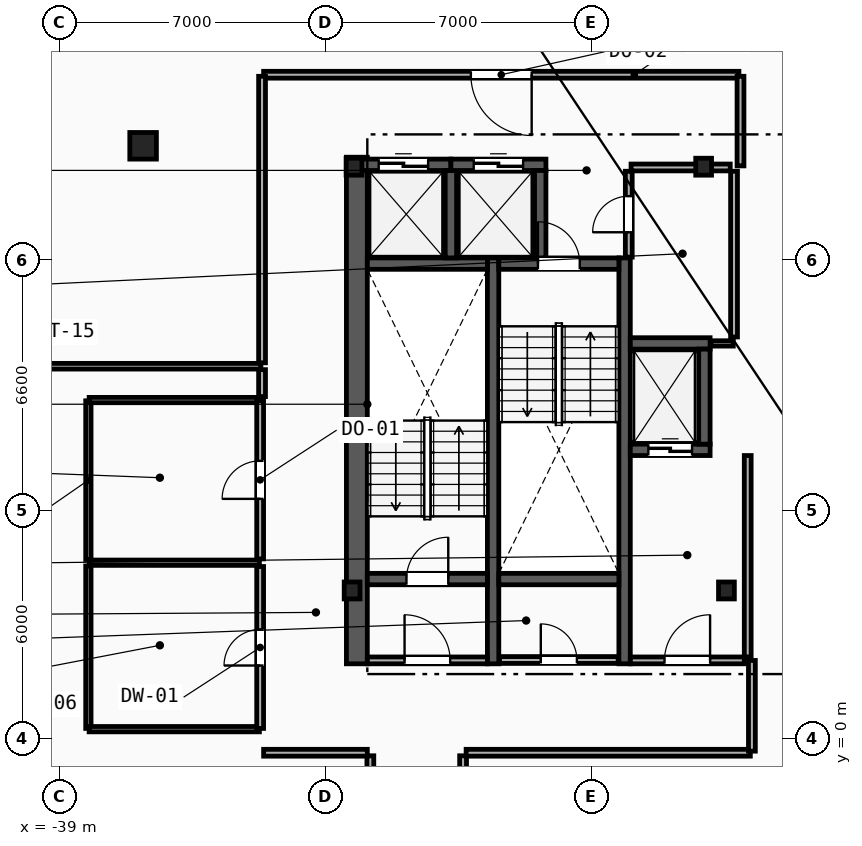
"""IFC4 building model, lengths in metres.
Left out: names, types, materials, properties, quantities, classifications, styles, units other than length and angle.
Written with IfcOpenShell. Run it as: python <this file> out.ifc"""

import sys

from ifc_helpers import new_model, si_unit, direction, frame, frame_2d, origin, origin_2d, place, context, subcontext, project, spatial, rectangle, i_section, extrude, element, fill, save


model = new_model("IFC4")
c1 = context("Model", 3, precision=1e-05, world=origin(), true_north=direction((0.0, 1.0)))
c2 = subcontext(c1, "Body", "Model", "MODEL_VIEW")
j1 = project(units=[si_unit("LENGTHUNIT", "METRE"), si_unit("PLANEANGLEUNIT", "RADIAN")], contexts=[c1])
p1 = place(None, origin())
s1 = spatial("IfcSite", under=j1, at=p1, CompositionType="ELEMENT")
p2 = place(p1, origin())
s2 = spatial("IfcBuilding", under=s1, at=p2, CompositionType="ELEMENT")
p3 = place(p2, frame((0.0, 0.0, 275.6)))
s3 = spatial("IfcBuildingStorey", under=s2, at=p3, CompositionType="ELEMENT", Elevation=275.6)
for number, where, z_axis, x_axis in (
    (1, (-31.3, 3.9, 0.0), (0.0, 0.0, 1.0), (1.0, 0.0, 0.0)),
    (2, (-21.45, 3.9, 0.0), (0.0, 0.0, 1.0), (1.0, 0.0, 0.0)),
    (3, (-22.05, 15.05, 0.0), (0.0, 0.0, 1.0), (1.0, 0.0, 0.0)),
    (4, (-31.25, 15.05, 0.0), (0.0, 0.0, 1.0), (1.0, 0.0, 0.0)),
):
    element("IfcColumn", number, at=place(p3, frame(where, z_axis=z_axis, x_axis=x_axis)), inside=s3, PredefinedType="COLUMN", context=c2, shape_type="SweptSolid", body=[
        extrude(i_section(OverallWidth=0.416, OverallDepth=0.446, WebThickness=0.039, FlangeThickness=0.063, FilletRadius=0.018, at=origin_2d()), origin(), (0.0, 0.0, 1.0), 3.6),
    ])
p4 = place(p3, frame((-36.8, 15.6, 0.0), z_axis=(0.0, 0.0, 1.0), x_axis=(1.0, 0.0, 0.0)))
e5 = element("IfcColumn", 5, at=p4, inside=s3, PredefinedType="COLUMN", context=c2, shape_type="SweptSolid", body=[
    extrude(rectangle(XDim=0.7, YDim=0.7, at=origin_2d()), origin(), (0.0, 0.0, 1.0), 3.6),
])
p5 = place(p3, frame((-31.175, 1.97, 0.0), z_axis=(0.0, 0.0, 1.0), x_axis=(0.0, 1.0, 0.0)))
e6 = element("IfcWall", 6, at=p5, inside=s3, PredefinedType="SHEAR", context=c2, shape_type="SweptSolid", body=[
    extrude(rectangle(XDim=13.33, YDim=0.55, at=frame_2d((6.665, 0.0))), origin(), (0.0, 0.0, 1.0), 3.34),
])
for number, where, z_axis, x_axis in (
    (7, (-27.59, 1.97, 0.0), (0.0, 0.0, 1.0), (0.0, 1.0, 0.0)),
    (8, (-24.13, 1.97, 0.0), (0.0, 0.0, 1.0), (0.0, 1.0, 0.0)),
):
    element("IfcWall", number, at=place(p3, frame(where, z_axis=z_axis, x_axis=x_axis)), inside=s3, PredefinedType="SHEAR", context=c2, shape_type="SweptSolid", body=[
        extrude(rectangle(XDim=10.68, YDim=0.3, at=frame_2d((5.34, 0.0))), origin(), (0.0, 0.0, 1.0), 3.34),
    ])
p6 = place(p3, frame((-30.9, 4.2, 0.0), z_axis=(0.0, 0.0, 1.0), x_axis=(1.0, 0.0, 0.0)))
e9 = element("IfcWall", 9, at=p6, inside=s3, PredefinedType="SHEAR", context=c2, shape_type="SweptSolid", body=[
    extrude(rectangle(XDim=3.16, YDim=0.3, at=frame_2d((1.58, 0.0))), origin(), (0.0, 0.0, 1.0), 3.34),
])
p7 = place(p6, frame((1.03, 0.0, 0.0)))
e10 = element("IfcOpeningElement", 10, at=p7, cuts=e9, PredefinedType="OPENING", context=c2, shape_type="SweptSolid", body=[
    extrude(rectangle(XDim=1.1, YDim=2.15, at=frame_2d((0.55, 1.075))), frame((0.0, 0.16, 0.0), z_axis=(0.0, -1.0, 0.0), x_axis=(1.0, 0.0, 0.0)), (0.0, 0.0, 1.0), 0.32),
])
p8 = place(p3, frame((-30.9, 12.5, 0.0), z_axis=(0.0, 0.0, 1.0), x_axis=(1.0, 0.0, 0.0)))
e11 = element("IfcWall", 11, at=p8, inside=s3, PredefinedType="SHEAR", context=c2, shape_type="SweptSolid", body=[
    extrude(rectangle(XDim=3.16, YDim=0.3, at=frame_2d((1.58, 0.0))), origin(), (0.0, 0.0, 1.0), 3.34),
])
p9 = place(p3, frame((-27.44, 12.5, 0.0), z_axis=(0.0, 0.0, 1.0), x_axis=(1.0, 0.0, 0.0)))
e12 = element("IfcWall", 12, at=p9, inside=s3, PredefinedType="SHEAR", context=c2, shape_type="SweptSolid", body=[
    extrude(rectangle(XDim=3.16, YDim=0.3, at=frame_2d((1.58, 0.0))), origin(), (0.0, 0.0, 1.0), 3.34),
])
p10 = place(p9, frame((1.03, 0.0, 0.0)))
e13 = element("IfcOpeningElement", 13, at=p10, cuts=e12, PredefinedType="OPENING", context=c2, shape_type="SweptSolid", body=[
    extrude(rectangle(XDim=1.1, YDim=2.15, at=frame_2d((0.55, 1.075))), frame((0.0, 0.16, 0.0), z_axis=(0.0, -1.0, 0.0), x_axis=(1.0, 0.0, 0.0)), (0.0, 0.0, 1.0), 0.32),
])
p11 = place(p3, frame((-27.44, 4.2, 0.0), z_axis=(0.0, 0.0, 1.0), x_axis=(1.0, 0.0, 0.0)))
e14 = element("IfcWall", 14, at=p11, inside=s3, PredefinedType="SHEAR", context=c2, shape_type="SweptSolid", body=[
    extrude(rectangle(XDim=3.16, YDim=0.3, at=frame_2d((1.58, 0.0))), origin(), (0.0, 0.0, 1.0), 3.34),
])
p12 = place(p3, frame((-20.89, 2.15, 0.0), z_axis=(0.0, 0.0, 1.0), x_axis=(0.0, 1.0, 0.0)))
e15 = element("IfcWall", 15, at=p12, inside=s3, PredefinedType="PARTITIONING", context=c2, shape_type="SweptSolid", body=[
    extrude(rectangle(XDim=5.3, YDim=0.18, at=frame_2d((2.65, 0.0))), origin(), (0.0, 0.0, 1.0), 3.34),
])
p13 = place(p3, frame((-23.98, 2.06, 0.0), z_axis=(0.0, 0.0, 1.0), x_axis=(1.0, 0.0, 0.0)))
e16 = element("IfcWall", 16, at=p13, inside=s3, PredefinedType="PARTITIONING", context=c2, shape_type="SweptSolid", body=[
    extrude(rectangle(XDim=3.0, YDim=0.18, at=frame_2d((1.5, 0.0))), origin(), (0.0, 0.0, 1.0), 3.34),
])
p14 = place(p13, frame((0.9, 0.0, 0.0)))
e17 = element("IfcOpeningElement", 17, at=p14, cuts=e16, PredefinedType="OPENING", context=c2, shape_type="SweptSolid", body=[
    extrude(rectangle(XDim=1.2, YDim=2.15, at=frame_2d((0.6, 1.075))), frame((0.0, 0.1, 0.0), z_axis=(0.0, -1.0, 0.0), x_axis=(1.0, 0.0, 0.0)), (0.0, 0.0, 1.0), 0.2),
])
p15 = place(p3, frame((-30.9, 2.06, 0.0), z_axis=(0.0, 0.0, 1.0), x_axis=(1.0, 0.0, 0.0)))
e18 = element("IfcWall", 18, at=p15, inside=s3, PredefinedType="PARTITIONING", context=c2, shape_type="SweptSolid", body=[
    extrude(rectangle(XDim=3.16, YDim=0.18, at=frame_2d((1.58, 0.0))), origin(), (0.0, 0.0, 1.0), 3.34),
])
p16 = place(p15, frame((0.98, 0.0, 0.0)))
e19 = element("IfcOpeningElement", 19, at=p16, cuts=e18, PredefinedType="OPENING", context=c2, shape_type="SweptSolid", body=[
    extrude(rectangle(XDim=1.2, YDim=2.15, at=frame_2d((0.6, 1.075))), frame((0.0, 0.1, 0.0), z_axis=(0.0, -1.0, 0.0), x_axis=(1.0, 0.0, 0.0)), (0.0, 0.0, 1.0), 0.2),
])
p17 = place(p3, frame((-23.98, 7.6, 0.0), z_axis=(0.0, 0.0, 1.0), x_axis=(1.0, 0.0, 0.0)))
e20 = element("IfcWall", 20, at=p17, inside=s3, PredefinedType="SHEAR", context=c2, shape_type="SweptSolid", body=[
    extrude(rectangle(XDim=2.1, YDim=0.3, at=frame_2d((1.05, 0.0))), origin(), (0.0, 0.0, 1.0), 3.34),
])
p18 = place(p17, frame((0.475, 0.0, 0.0)))
e21 = element("IfcOpeningElement", 21, at=p18, cuts=e20, PredefinedType="OPENING", context=c2, shape_type="SweptSolid", body=[
    extrude(rectangle(XDim=1.15, YDim=2.2, at=frame_2d((0.575, 1.1))), frame((0.0, 0.16, 0.0), z_axis=(0.0, -1.0, 0.0), x_axis=(1.0, 0.0, 0.0)), (0.0, 0.0, 1.0), 0.32),
])
p19 = place(p3, frame((-23.98, 10.4, 0.0), z_axis=(0.0, 0.0, 1.0), x_axis=(1.0, 0.0, 0.0)))
e22 = element("IfcWall", 22, at=p19, inside=s3, PredefinedType="SHEAR", context=c2, shape_type="SweptSolid", body=[
    extrude(rectangle(XDim=2.1, YDim=0.3, at=frame_2d((1.05, 0.0))), origin(), (0.0, 0.0, 1.0), 3.34),
])
p20 = place(p3, frame((-22.03, 7.75, 0.0), z_axis=(0.0, 0.0, 1.0), x_axis=(0.0, 1.0, 0.0)))
e23 = element("IfcWall", 23, at=p20, inside=s3, PredefinedType="SHEAR", context=c2, shape_type="SweptSolid", body=[
    extrude(rectangle(XDim=2.5, YDim=0.3, at=frame_2d((1.25, 0.0))), origin(), (0.0, 0.0, 1.0), 3.34),
])
p21 = place(p3, frame((-31.2, 15.1, 0.0), z_axis=(0.0, 0.0, 1.0), x_axis=(1.0, 0.0, 0.0)))
e24 = element("IfcWall", 24, at=p21, inside=s3, PredefinedType="SHEAR", context=c2, shape_type="SweptSolid", body=[
    extrude(rectangle(XDim=2.5, YDim=0.3, at=frame_2d((1.25, 0.0))), origin(), (0.0, 0.0, 1.0), 3.34),
])
p22 = place(p21, frame((0.6, 0.0, 0.0)))
e25 = element("IfcOpeningElement", 25, at=p22, cuts=e24, PredefinedType="OPENING", context=c2, shape_type="SweptSolid", body=[
    extrude(rectangle(XDim=1.3, YDim=2.2, at=frame_2d((0.65, 1.1))), frame((0.0, 0.16, 0.0), z_axis=(0.0, -1.0, 0.0), x_axis=(1.0, 0.0, 0.0)), (0.0, 0.0, 1.0), 0.32),
])
p23 = place(p3, frame((-28.7, 12.65, 0.0), z_axis=(0.0, 0.0, 1.0), x_axis=(0.0, 1.0, 0.0)))
e26 = element("IfcWall", 26, at=p23, inside=s3, PredefinedType="SHEAR", context=c2, shape_type="SweptSolid", body=[
    extrude(rectangle(XDim=2.3, YDim=0.3, at=frame_2d((1.15, 0.0))), origin(), (0.0, 0.0, 1.0), 3.34),
])
p24 = place(p3, frame((-28.7, 15.1, 0.0), z_axis=(0.0, 0.0, 1.0), x_axis=(1.0, 0.0, 0.0)))
e27 = element("IfcWall", 27, at=p24, inside=s3, PredefinedType="SHEAR", context=c2, shape_type="SweptSolid", body=[
    extrude(rectangle(XDim=2.5, YDim=0.3, at=frame_2d((1.25, 0.0))), origin(), (0.0, 0.0, 1.0), 3.34),
])
p25 = place(p24, frame((0.6, 0.0, 0.0)))
e28 = element("IfcOpeningElement", 28, at=p25, cuts=e27, PredefinedType="OPENING", context=c2, shape_type="SweptSolid", body=[
    extrude(rectangle(XDim=1.3, YDim=2.2, at=frame_2d((0.65, 1.1))), frame((0.0, 0.16, 0.0), z_axis=(0.0, -1.0, 0.0), x_axis=(1.0, 0.0, 0.0)), (0.0, 0.0, 1.0), 0.32),
])
p26 = place(p3, frame((-26.35, 12.65, 0.0), z_axis=(0.0, 0.0, 1.0), x_axis=(0.0, 1.0, 0.0)))
e29 = element("IfcWall", 29, at=p26, inside=s3, PredefinedType="SHEAR", context=c2, shape_type="SweptSolid", body=[
    extrude(rectangle(XDim=2.3, YDim=0.3, at=frame_2d((1.15, 0.0))), origin(), (0.0, 0.0, 1.0), 3.34),
])
p27 = place(p3, frame((-21.86, 10.4, 0.0), z_axis=(0.0, 0.0, 1.0), x_axis=(1.0, 0.0, 0.0)))
e30 = element("IfcWall", 30, at=p27, inside=s3, PredefinedType="PARTITIONING", context=c2, shape_type="SweptSolid", body=[
    extrude(rectangle(XDim=0.59, YDim=0.14, at=frame_2d((0.295, 0.0))), origin(), (0.0, 0.0, 1.0), 3.34),
])
p28 = place(p3, frame((-21.25, 10.57, 0.0), z_axis=(0.0, 0.0, 1.0), x_axis=(0.0, 1.0, 0.0)))
e31 = element("IfcWall", 31, at=p28, inside=s3, PredefinedType="PARTITIONING", context=c2, shape_type="SweptSolid", body=[
    extrude(rectangle(XDim=4.36, YDim=0.18, at=frame_2d((2.18, 0.0))), origin(), (0.0, 0.0, 1.0), 3.34),
])
p29 = place(p3, frame((-23.96, 15.03, 0.0), z_axis=(0.0, 0.0, 1.0), x_axis=(1.0, 0.0, 0.0)))
e32 = element("IfcWall", 32, at=p29, inside=s3, PredefinedType="PARTITIONING", context=c2, shape_type="SweptSolid", body=[
    extrude(rectangle(XDim=2.61, YDim=0.18, at=frame_2d((1.305, 0.0))), origin(), (0.0, 0.0, 1.0), 2.413),
])
p30 = place(p3, frame((-27.42, 2.07, 0.0), z_axis=(0.0, 0.0, 1.0), x_axis=(1.0, 0.0, 0.0)))
e33 = element("IfcWall", 33, at=p30, inside=s3, PredefinedType="PARTITIONING", context=c2, shape_type="SweptSolid", body=[
    extrude(rectangle(XDim=3.12, YDim=0.18, at=frame_2d((1.56, 0.0))), origin(), (0.0, 0.0, 1.0), 3.34),
])
p31 = place(p30, frame((1.085, 0.0, 0.0)))
e34 = element("IfcOpeningElement", 34, at=p31, cuts=e33, PredefinedType="OPENING", context=c2, shape_type="SweptSolid", body=[
    extrude(rectangle(XDim=0.95, YDim=2.1, at=frame_2d((0.475, 1.05))), frame((0.0, 0.1, 0.0), z_axis=(0.0, -1.0, 0.0), x_axis=(1.0, 0.0, 0.0)), (0.0, 0.0, 1.0), 0.2),
])
p32 = place(p3, frame((-24.02, 12.67, 0.0), z_axis=(0.0, 0.0, 1.0), x_axis=(0.0, 1.0, 0.0)))
e35 = element("IfcWall", 35, at=p32, inside=s3, PredefinedType="PARTITIONING", context=c2, shape_type="SweptSolid", body=[
    extrude(rectangle(XDim=2.26, YDim=0.18, at=frame_2d((1.13, 0.0))), origin(), (0.0, 0.0, 1.0), 3.34),
])
p33 = place(p32, frame((0.655, 0.0, 0.0)))
e36 = element("IfcOpeningElement", 36, at=p33, cuts=e35, PredefinedType="OPENING", context=c2, shape_type="SweptSolid", body=[
    extrude(rectangle(XDim=0.95, YDim=2.1, at=frame_2d((0.475, 1.05))), frame((0.0, 0.1, 0.0), z_axis=(0.0, -1.0, 0.0), x_axis=(1.0, 0.0, 0.0)), (0.0, 0.0, 1.0), 0.2),
])
p34 = place(p3, frame((-38.24, 0.27, 0.0), z_axis=(0.0, 0.0, 1.0), x_axis=(0.0, 1.0, 0.0)))
e37 = element("IfcWall", 37, at=p34, inside=s3, PredefinedType="PARTITIONING", context=c2, shape_type="SweptSolid", body=[
    extrude(rectangle(XDim=4.275, YDim=0.14, at=frame_2d((2.137, 0.0))), origin(), (0.0, 0.0, 1.0), 3.34),
])
p35 = place(p3, frame((-38.24, 4.715, 0.0), z_axis=(0.0, 0.0, 1.0), x_axis=(0.0, 1.0, 0.0)))
e38 = element("IfcWall", 38, at=p35, inside=s3, PredefinedType="PARTITIONING", context=c2, shape_type="SweptSolid", body=[
    extrude(rectangle(XDim=4.175, YDim=0.14, at=frame_2d((2.087, 0.0))), origin(), (0.0, 0.0, 1.0), 3.34),
])
for number, where, z_axis, x_axis in (
    (39, (-38.22, 0.25, 0.0), (0.0, 0.0, 1.0), (1.0, 0.0, 0.0)),
    (40, (-38.22, 4.63, 0.0), (0.0, 0.0, 1.0), (1.0, 0.0, 0.0)),
    (41, (-38.22, 8.91, 0.0), (0.0, 0.0, 1.0), (1.0, 0.0, 0.0)),
):
    element("IfcWall", number, at=place(p3, frame(where, z_axis=z_axis, x_axis=x_axis)), inside=s3, PredefinedType="PARTITIONING", context=c2, shape_type="SweptSolid", body=[
        extrude(rectangle(XDim=4.48, YDim=0.14, at=frame_2d((2.24, 0.0))), origin(), (0.0, 0.0, 1.0), 3.34),
    ])
p36 = place(p3, frame((-33.72, 0.27, 0.0), z_axis=(0.0, 0.0, 1.0), x_axis=(0.0, 1.0, 0.0)))
e42 = element("IfcWall", 42, at=p36, inside=s3, PredefinedType="PARTITIONING", context=c2, shape_type="SweptSolid", body=[
    extrude(rectangle(XDim=4.26, YDim=0.18, at=frame_2d((2.13, 0.0))), origin(), (0.0, 0.0, 1.0), 3.34),
])
p37 = place(p36, frame((1.655, 0.0, 0.0)))
e43 = element("IfcOpeningElement", 43, at=p37, cuts=e42, PredefinedType="OPENING", context=c2, shape_type="SweptSolid", body=[
    extrude(rectangle(XDim=0.95, YDim=2.1, at=frame_2d((0.475, 1.05))), frame((0.0, 0.1, 0.0), z_axis=(0.0, -1.0, 0.0), x_axis=(1.0, 0.0, 0.0)), (0.0, 0.0, 1.0), 0.2),
])
p38 = place(p3, frame((-33.72, 4.73, 0.0), z_axis=(0.0, 0.0, 1.0), x_axis=(0.0, 1.0, 0.0)))
e44 = element("IfcWall", 44, at=p38, inside=s3, PredefinedType="PARTITIONING", context=c2, shape_type="SweptSolid", body=[
    extrude(rectangle(XDim=4.16, YDim=0.18, at=frame_2d((2.08, 0.0))), origin(), (0.0, 0.0, 1.0), 3.34),
])
p39 = place(p38, frame((1.58, 0.0, 0.0)))
e45 = element("IfcOpeningElement", 45, at=p39, cuts=e44, PredefinedType="OPENING", context=c2, shape_type="SweptSolid", body=[
    extrude(rectangle(XDim=1.0, YDim=2.15, at=frame_2d((0.5, 1.075))), frame((0.0, 0.1, 0.0), z_axis=(0.0, -1.0, 0.0), x_axis=(1.0, 0.0, 0.0)), (0.0, 0.0, 1.0), 0.2),
])
p40 = place(p3, frame((-48.38, 9.8, 0.0), z_axis=(0.0, 0.0, 1.0), x_axis=(1.0, 0.0, 0.0)))
e46 = element("IfcWall", 46, at=p40, inside=s3, PredefinedType="PARTITIONING", context=c2, shape_type="SweptSolid", body=[
    extrude(rectangle(XDim=14.68, YDim=0.15, at=frame_2d((7.34, 0.0))), origin(), (0.0, 0.0, 1.0), 3.34),
])
p41 = place(p3, frame((-21.122, 17.47, 0.0), z_axis=(0.0, 0.0, 1.0), x_axis=(-1.0, 0.0, 0.0)))
e47 = element("IfcWall", 47, at=p41, inside=s3, PredefinedType="PARTITIONING", context=c2, shape_type="SweptSolid", body=[
    extrude(rectangle(XDim=12.507, YDim=0.18, at=frame_2d((6.253, 0.0))), origin(), (0.0, 0.0, 1.0), 3.34),
])
p42 = place(p41, frame((5.454, 0.0, 0.0)))
e48 = element("IfcOpeningElement", 48, at=p42, cuts=e47, PredefinedType="OPENING", context=c2, shape_type="SweptSolid", body=[
    extrude(rectangle(XDim=1.6, YDim=2.2, at=frame_2d((0.8, 1.1))), frame((0.0, 0.1, 0.0), z_axis=(0.0, -1.0, 0.0), x_axis=(1.0, 0.0, 0.0)), (0.0, 0.0, 1.0), 0.2),
])
for number, where, z_axis, x_axis in (
    (49, (-30.82, -0.45, 0.0), (0.0, 0.0, 1.0), (0.0, -1.0, 0.0)),
    (50, (-28.38, -10.779, 0.0), (0.0, 0.0, 1.0), (0.0, 1.0, 0.0)),
):
    element("IfcWall", number, at=place(p3, frame(where, z_axis=z_axis, x_axis=x_axis)), inside=s3, PredefinedType="PARTITIONING", context=c2, shape_type="SweptSolid", body=[
        extrude(rectangle(XDim=10.329, YDim=0.18, at=frame_2d((5.164, 0.0))), origin(), (0.0, 0.0, 1.0), 3.34),
    ])
p43 = place(p3, frame((-33.67, 17.428, 0.0), z_axis=(0.0, 0.0, 1.0), x_axis=(0.0, -1.0, 0.0)))
e51 = element("IfcWall", 51, at=p43, inside=s3, PredefinedType="PARTITIONING", context=c2, shape_type="SweptSolid", body=[
    extrude(rectangle(XDim=7.539, YDim=0.18, at=frame_2d((3.769, 0.0))), origin(), (0.0, 0.0, 1.0), 3.34),
])
p44 = place(p3, frame((-28.3, -0.37, 0.0), z_axis=(0.0, 0.0, 1.0), x_axis=(1.0, 0.0, 0.0)))
e52 = element("IfcWall", 52, at=p44, inside=s3, PredefinedType="PARTITIONING", context=c2, shape_type="SweptSolid", body=[
    extrude(rectangle(XDim=7.479, YDim=0.18, at=frame_2d((3.739, 0.0))), origin(), (0.0, 0.0, 1.0), 3.34),
])
p45 = place(p3, frame((-33.628, -0.37, 0.0), z_axis=(0.0, 0.0, 1.0), x_axis=(1.0, 0.0, 0.0)))
e53 = element("IfcWall", 53, at=p45, inside=s3, PredefinedType="PARTITIONING", context=c2, shape_type="SweptSolid", body=[
    extrude(rectangle(XDim=2.729, YDim=0.18, at=frame_2d((1.364, 0.0))), origin(), (0.0, 0.0, 1.0), 3.34),
])
p46 = place(p3, frame((-20.78, -0.329, 0.0), z_axis=(0.0, 0.0, 1.0), x_axis=(0.0, 1.0, 0.0)))
e54 = element("IfcWall", 54, at=p46, inside=s3, PredefinedType="PARTITIONING", context=c2, shape_type="SweptSolid", body=[
    extrude(rectangle(XDim=2.387, YDim=0.18, at=frame_2d((1.194, 0.0))), origin(), (0.0, 0.0, 1.0), 3.34),
])
p47 = place(p3, frame((-21.08, 15.072, 0.0), z_axis=(0.0, 0.0, 1.0), x_axis=(0.0, 1.0, 0.0)))
e55 = element("IfcWall", 55, at=p47, inside=s3, PredefinedType="PARTITIONING", context=c2, shape_type="SweptSolid", body=[
    extrude(rectangle(XDim=2.357, YDim=0.18, at=frame_2d((1.178, 0.0))), origin(), (0.0, 0.0, 1.0), 3.34),
])
p48 = place(p3, frame((-33.67, 9.71, 0.0), z_axis=(0.0, 0.0, 1.0), x_axis=(0.0, -1.0, 0.0)))
e56 = element("IfcWall", 56, at=p48, inside=s3, PredefinedType="PARTITIONING", context=c2, shape_type="SweptSolid", body=[
    extrude(rectangle(XDim=0.708, YDim=0.18, at=frame_2d((0.354, 0.0))), origin(), (0.0, 0.0, 1.0), 3.34),
])
p49 = place(p7, origin())
e57 = element("IfcDoor", 57, at=p49, inside=s3, OperationType="SINGLE_SWING_RIGHT", PredefinedType="DOOR", context=c2, shape_type="SweptSolid", body=[
    extrude(rectangle(XDim=1.1, YDim=2.15, at=frame_2d((0.55, 1.075))), frame((0.0, 0.025, 0.0), z_axis=(0.0, -1.0, 0.0), x_axis=(1.0, 0.0, 0.0)), (0.0, 0.0, 1.0), 0.05),
])
fill(e10, e57)
p50 = place(p10, origin())
e58 = element("IfcDoor", 58, at=p50, inside=s3, OperationType="SINGLE_SWING_LEFT", PredefinedType="DOOR", context=c2, shape_type="SweptSolid", body=[
    extrude(rectangle(XDim=1.1, YDim=2.15, at=frame_2d((0.55, 1.075))), frame((0.0, 0.025, 0.0), z_axis=(0.0, -1.0, 0.0), x_axis=(1.0, 0.0, 0.0)), (0.0, 0.0, 1.0), 0.05),
])
fill(e13, e58)
p51 = place(p14, origin())
e59 = element("IfcDoor", 59, at=p51, inside=s3, OperationType="SINGLE_SWING_RIGHT", PredefinedType="DOOR", context=c2, shape_type="SweptSolid", body=[
    extrude(rectangle(XDim=1.2, YDim=2.15, at=frame_2d((0.6, 1.075))), frame((0.0, 0.025, 0.0), z_axis=(0.0, -1.0, 0.0), x_axis=(1.0, 0.0, 0.0)), (0.0, 0.0, 1.0), 0.05),
])
fill(e17, e59)
p52 = place(p16, origin())
e60 = element("IfcDoor", 60, at=p52, inside=s3, OperationType="SINGLE_SWING_LEFT", PredefinedType="DOOR", context=c2, shape_type="SweptSolid", body=[
    extrude(rectangle(XDim=1.2, YDim=2.15, at=frame_2d((0.6, 1.075))), frame((0.0, 0.025, 0.0), z_axis=(0.0, -1.0, 0.0), x_axis=(1.0, 0.0, 0.0)), (0.0, 0.0, 1.0), 0.05),
])
fill(e19, e60)
p53 = place(p18, origin())
e61 = element("IfcDoor", 61, at=p53, inside=s3, OperationType="SLIDING_TO_LEFT", PredefinedType="TRAPDOOR", context=c2, shape_type="SweptSolid", body=[
    extrude(rectangle(XDim=1.15, YDim=2.2, at=frame_2d((0.575, 1.1))), frame((0.0, 0.025, 0.0), z_axis=(0.0, -1.0, 0.0), x_axis=(1.0, 0.0, 0.0)), (0.0, 0.0, 1.0), 0.05),
])
fill(e21, e61)
p54 = place(p22, origin())
e62 = element("IfcDoor", 62, at=p54, inside=s3, OperationType="SLIDING_TO_LEFT", PredefinedType="TRAPDOOR", context=c2, shape_type="SweptSolid", body=[
    extrude(rectangle(XDim=1.3, YDim=2.2, at=frame_2d((0.65, 1.1))), frame((0.0, 0.025, 0.0), z_axis=(0.0, -1.0, 0.0), x_axis=(1.0, 0.0, 0.0)), (0.0, 0.0, 1.0), 0.05),
])
fill(e25, e62)
p55 = place(p25, origin())
e63 = element("IfcDoor", 63, at=p55, inside=s3, OperationType="SLIDING_TO_LEFT", PredefinedType="TRAPDOOR", context=c2, shape_type="SweptSolid", body=[
    extrude(rectangle(XDim=1.3, YDim=2.2, at=frame_2d((0.65, 1.1))), frame((0.0, 0.025, 0.0), z_axis=(0.0, -1.0, 0.0), x_axis=(1.0, 0.0, 0.0)), (0.0, 0.0, 1.0), 0.05),
])
fill(e28, e63)
p56 = place(p42, origin())
e64 = element("IfcDoor", 64, at=p56, inside=s3, OperationType="SINGLE_SWING_LEFT", PredefinedType="DOOR", context=c2, shape_type="SweptSolid", body=[
    extrude(rectangle(XDim=1.6, YDim=2.2, at=frame_2d((0.8, 1.1))), frame((0.0, 0.025, 0.0), z_axis=(0.0, -1.0, 0.0), x_axis=(1.0, 0.0, 0.0)), (0.0, 0.0, 1.0), 0.05),
])
fill(e48, e64)
p57 = place(p37, origin())
e65 = element("IfcDoor", 65, at=p57, inside=s3, OperationType="SINGLE_SWING_LEFT", PredefinedType="DOOR", context=c2, shape_type="SweptSolid", body=[
    extrude(rectangle(XDim=0.95, YDim=2.1, at=frame_2d((0.475, 1.05))), frame((0.0, 0.025, 0.0), z_axis=(0.0, -1.0, 0.0), x_axis=(1.0, 0.0, 0.0)), (0.0, 0.0, 1.0), 0.05),
])
fill(e43, e65)
p58 = place(p39, origin())
e66 = element("IfcDoor", 66, at=p58, inside=s3, OperationType="SINGLE_SWING_LEFT", PredefinedType="DOOR", context=c2, shape_type="SweptSolid", body=[
    extrude(rectangle(XDim=1.0, YDim=2.15, at=frame_2d((0.5, 1.075))), frame((0.0, 0.025, 0.0), z_axis=(0.0, -1.0, 0.0), x_axis=(1.0, 0.0, 0.0)), (0.0, 0.0, 1.0), 0.05),
])
fill(e45, e66)
p59 = place(p31, origin())
e67 = element("IfcDoor", 67, at=p59, inside=s3, OperationType="SINGLE_SWING_LEFT", PredefinedType="DOOR", context=c2, shape_type="SweptSolid", body=[
    extrude(rectangle(XDim=0.95, YDim=2.1, at=frame_2d((0.475, 1.05))), frame((0.0, 0.025, 0.0), z_axis=(0.0, -1.0, 0.0), x_axis=(1.0, 0.0, 0.0)), (0.0, 0.0, 1.0), 0.05),
])
fill(e34, e67)
p60 = place(p33, origin())
e68 = element("IfcDoor", 68, at=p60, inside=s3, OperationType="SINGLE_SWING_LEFT", PredefinedType="DOOR", context=c2, shape_type="SweptSolid", body=[
    extrude(rectangle(XDim=0.95, YDim=2.1, at=frame_2d((0.475, 1.05))), frame((0.0, 0.025, 0.0), z_axis=(0.0, -1.0, 0.0), x_axis=(1.0, 0.0, 0.0)), (0.0, 0.0, 1.0), 0.05),
])
fill(e36, e68)
save(model, sys.argv[1])
